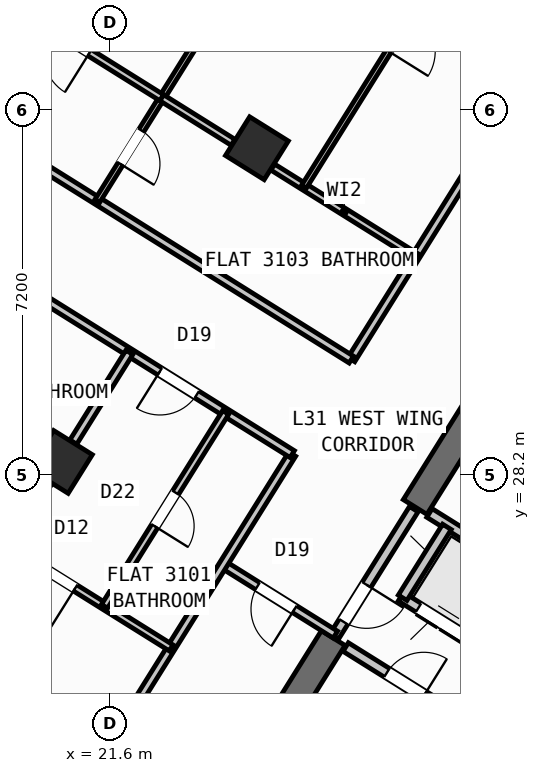
"""IFC4 building model, lengths in metres.
Left out: names, types, materials, properties, quantities, classifications, styles, units other than length and angle.
Written with IfcOpenShell. Run it as: python <this file> out.ifc"""

import sys

from ifc_helpers import new_model, si_unit, direction, frame, frame_2d, origin, origin_2d, place, context, subcontext, project, spatial, rectangle, hollow_rectangle, extrude, source, transform, mapped, element, fill, save


model = new_model("IFC4")
c1 = context("Model", 3, precision=1e-05, world=origin(), true_north=direction((0.0, 1.0)))
c2 = subcontext(c1, "Body", "Model", "MODEL_VIEW")
j1 = project(units=[si_unit("LENGTHUNIT", "METRE"), si_unit("PLANEANGLEUNIT", "RADIAN")], contexts=[c1])
p1 = place(None, origin())
s1 = spatial("IfcSite", under=j1, at=p1, CompositionType="ELEMENT")
p2 = place(p1, origin())
s2 = spatial("IfcBuilding", under=s1, at=p2, CompositionType="ELEMENT")
p3 = place(p2, frame((0.0, 0.0, 123.3)))
s3 = spatial("IfcBuildingStorey", under=s2, at=p3, CompositionType="ELEMENT", Elevation=123.3)
p4 = place(p3, frame((29.517, 30.594, 0.0), z_axis=(0.0, 0.0, 1.0), x_axis=(-0.529906864564, -0.848055844204, 0.0)))
e1 = element("IfcWall", 1, at=p4, inside=s3, PredefinedType="SHEAR", context=c2, shape_type="SweptSolid", body=[
    extrude(rectangle(XDim=3.575, YDim=0.55, at=frame_2d((1.788, 0.0))), origin(), (0.0, 0.0, 1.0), 4.22),
])
p5 = place(p3, frame((26.007, 24.976, 0.0), z_axis=(0.0, 0.0, 1.0), x_axis=(-0.529923795287, -0.848045264823, 0.0)))
e2 = element("IfcWall", 2, at=p5, inside=s3, PredefinedType="SHEAR", context=c2, shape_type="SweptSolid", body=[
    extrude(rectangle(XDim=6.425, YDim=0.55, at=frame_2d((3.212, 0.0))), origin(), (0.0, 0.0, 1.0), 4.22),
])
m1 = source(origin(), c2, "Body", "SweptSolid", [
    extrude(hollow_rectangle(XDim=0.9, YDim=0.9, WallThickness=0.036, at=origin_2d()), origin(), (0.0, 0.0, 1.0), 4.5),
])
for number, where, z_axis, x_axis in (
    (3, (24.5, 34.643, 0.0), (0.0, 0.0, 1.0), (-0.848, 0.53, 0.0)),
    (4, (20.632, 28.452, 0.0), (0.0, 0.0, 1.0), (-0.848, 0.53, 0.0)),
):
    element("IfcColumn", number, at=place(p3, frame(where, z_axis=z_axis, x_axis=x_axis)), inside=s3, PredefinedType="COLUMN", context=c2, shape_type="MappedRepresentation", body=[
        mapped(m1, transform((0.0, 0.0, 0.0), scale=1.0)),
    ])
p6 = place(p3, frame((31.76, 12.183, 0.0), z_axis=(0.0, 0.0, 1.0), x_axis=(-0.848047074256, 0.529920899612, 0.0)))
e5 = element("IfcWall", 5, at=p6, inside=s3, PredefinedType="STANDARD", context=c2, shape_type="SweptSolid", body=[
    extrude(rectangle(XDim=30.652, YDim=0.32, at=frame_2d((15.326, 0.0))), origin(), (0.0, 0.0, 1.0), 4.22),
])
p7 = place(p6, frame((14.966, 0.0, 0.0)))
e6 = element("IfcOpeningElement", 6, at=p7, cuts=e5, PredefinedType="OPENING", context=c2, shape_type="SweptSolid", body=[
    extrude(rectangle(XDim=1.2, YDim=2.15, at=frame_2d((0.6, 1.075))), frame((0.0, 0.17, 0.0), z_axis=(0.0, -1.0, 0.0), x_axis=(1.0, 0.0, 0.0)), (0.0, 0.0, 1.0), 0.34),
])
p8 = place(p6, frame((1.871, 0.0, 0.8)))
e7 = element("IfcOpeningElement", 7, at=p8, cuts=e5, PredefinedType="OPENING", context=c2, shape_type="SweptSolid", body=[
    extrude(rectangle(XDim=2.1, YDim=1.55, at=frame_2d((1.05, 0.775))), frame((0.0, 0.17, 0.0), z_axis=(0.0, -1.0, 0.0), x_axis=(1.0, 0.0, 0.0)), (0.0, 0.0, 1.0), 0.34),
])
p9 = place(p6, frame((6.546, 0.0, 0.8)))
e8 = element("IfcOpeningElement", 8, at=p9, cuts=e5, PredefinedType="OPENING", context=c2, shape_type="SweptSolid", body=[
    extrude(rectangle(XDim=2.1, YDim=1.55, at=frame_2d((1.05, 0.775))), frame((0.0, 0.17, 0.0), z_axis=(0.0, -1.0, 0.0), x_axis=(1.0, 0.0, 0.0)), (0.0, 0.0, 1.0), 0.34),
])
p10 = place(p6, frame((20.508, 0.0, 0.85)))
e9 = element("IfcOpeningElement", 9, at=p10, cuts=e5, PredefinedType="OPENING", context=c2, shape_type="SweptSolid", body=[
    extrude(rectangle(XDim=1.5, YDim=1.5, at=frame_2d((0.75, 0.75))), frame((0.0, 0.17, 0.0), z_axis=(0.0, -1.0, 0.0), x_axis=(1.0, 0.0, 0.0)), (0.0, 0.0, 1.0), 0.34),
])
p11 = place(p6, frame((27.253, 0.0, 0.95)))
e10 = element("IfcOpeningElement", 10, at=p11, cuts=e5, PredefinedType="OPENING", context=c2, shape_type="SweptSolid", body=[
    extrude(rectangle(XDim=1.2, YDim=1.4, at=frame_2d((0.6, 0.7))), frame((0.0, 0.17, 0.0), z_axis=(0.0, -1.0, 0.0), x_axis=(1.0, 0.0, 0.0)), (0.0, 0.0, 1.0), 0.34),
])
p12 = place(p3, frame((17.424, 47.083, 0.0), z_axis=(0.0, 0.0, 1.0), x_axis=(0.848049927979, -0.529916332693, 0.0)))
e11 = element("IfcWall", 11, at=p12, inside=s3, PredefinedType="STANDARD", context=c2, shape_type="SweptSolid", body=[
    extrude(rectangle(XDim=29.223, YDim=0.32, at=frame_2d((14.612, 0.0))), origin(), (0.0, 0.0, 1.0), 4.22),
])
p13 = place(p12, frame((8.839, 0.0, 0.0)))
e12 = element("IfcOpeningElement", 12, at=p13, cuts=e11, PredefinedType="OPENING", context=c2, shape_type="SweptSolid", body=[
    extrude(rectangle(XDim=1.05, YDim=2.15, at=frame_2d((0.525, 1.075))), frame((0.0, 0.17, 0.0), z_axis=(0.0, -1.0, 0.0), x_axis=(1.0, 0.0, 0.0)), (0.0, 0.0, 1.0), 0.34),
])
p14 = place(p12, frame((0.719, 0.0, 0.85)))
e13 = element("IfcOpeningElement", 13, at=p14, cuts=e11, PredefinedType="OPENING", context=c2, shape_type="SweptSolid", body=[
    extrude(rectangle(XDim=1.8, YDim=1.5, at=frame_2d((0.9, 0.75))), frame((0.0, 0.17, 0.0), z_axis=(0.0, -1.0, 0.0), x_axis=(1.0, 0.0, 0.0)), (0.0, 0.0, 1.0), 0.34),
])
p15 = place(p12, frame((3.981, 0.0, 0.85)))
e14 = element("IfcOpeningElement", 14, at=p15, cuts=e11, PredefinedType="OPENING", context=c2, shape_type="SweptSolid", body=[
    extrude(rectangle(XDim=1.5, YDim=1.5, at=frame_2d((0.75, 0.75))), frame((0.0, 0.17, 0.0), z_axis=(0.0, -1.0, 0.0), x_axis=(1.0, 0.0, 0.0)), (0.0, 0.0, 1.0), 0.34),
])
p16 = place(p12, frame((7.021, 0.0, 0.95)))
e15 = element("IfcOpeningElement", 15, at=p16, cuts=e11, PredefinedType="OPENING", context=c2, shape_type="SweptSolid", body=[
    extrude(rectangle(XDim=1.2, YDim=1.4, at=frame_2d((0.6, 0.7))), frame((0.0, 0.17, 0.0), z_axis=(0.0, -1.0, 0.0), x_axis=(1.0, 0.0, 0.0)), (0.0, 0.0, 1.0), 0.34),
])
p17 = place(p12, frame((14.471, 0.0, 0.95)))
e16 = element("IfcOpeningElement", 16, at=p17, cuts=e11, PredefinedType="OPENING", context=c2, shape_type="SweptSolid", body=[
    extrude(rectangle(XDim=1.2, YDim=1.4, at=frame_2d((0.6, 0.7))), frame((0.0, 0.17, 0.0), z_axis=(0.0, -1.0, 0.0), x_axis=(1.0, 0.0, 0.0)), (0.0, 0.0, 1.0), 0.34),
])
p18 = place(p12, frame((17.254, 0.0, 1.0)))
e17 = element("IfcOpeningElement", 17, at=p18, cuts=e11, PredefinedType="OPENING", context=c2, shape_type="SweptSolid", body=[
    extrude(rectangle(XDim=0.9, YDim=1.25, at=frame_2d((0.45, 0.625))), frame((0.0, 0.17, 0.0), z_axis=(0.0, -1.0, 0.0), x_axis=(1.0, 0.0, 0.0)), (0.0, 0.0, 1.0), 0.34),
])
p19 = place(p12, frame((20.764, 0.0, 0.8)))
e18 = element("IfcOpeningElement", 18, at=p19, cuts=e11, PredefinedType="OPENING", context=c2, shape_type="SweptSolid", body=[
    extrude(rectangle(XDim=2.1, YDim=1.55, at=frame_2d((1.05, 0.775))), frame((0.0, 0.17, 0.0), z_axis=(0.0, -1.0, 0.0), x_axis=(1.0, 0.0, 0.0)), (0.0, 0.0, 1.0), 0.34),
])
p20 = place(p12, frame((25.403, 0.0, 0.8)))
e19 = element("IfcOpeningElement", 19, at=p20, cuts=e11, PredefinedType="OPENING", context=c2, shape_type="SweptSolid", body=[
    extrude(rectangle(XDim=2.1, YDim=1.55, at=frame_2d((1.05, 0.775))), frame((0.0, 0.17, 0.0), z_axis=(0.0, -1.0, 0.0), x_axis=(1.0, 0.0, 0.0)), (0.0, 0.0, 1.0), 0.34),
])
p21 = place(p3, frame((31.822, 24.998, 0.0), z_axis=(0.0, 0.0, 1.0), x_axis=(-0.848036912365, 0.52993716162, 0.0)))
e20 = element("IfcWall", 20, at=p21, inside=s3, PredefinedType="STANDARD", context=c2, shape_type="SweptSolid", body=[
    extrude(rectangle(XDim=4.618, YDim=0.2, at=frame_2d((2.309, 0.0))), origin(), (0.0, 0.0, 1.0), 4.21),
])
p22 = place(p3, frame((32.108, 22.814, 0.0), z_axis=(0.0, 0.0, 1.0), x_axis=(-0.848042229521, 0.529928652696, 0.0)))
e21 = element("IfcWall", 21, at=p22, inside=s3, PredefinedType="STANDARD", context=c2, shape_type="SweptSolid", body=[
    extrude(rectangle(XDim=5.62, YDim=0.2, at=frame_2d((2.81, 0.0))), origin(), (0.0, 0.0, 1.0), 4.21),
])
p23 = place(p22, frame((0.39, 0.0, 0.0)))
e22 = element("IfcOpeningElement", 22, at=p23, cuts=e21, PredefinedType="OPENING", context=c2, shape_type="SweptSolid", body=[
    extrude(rectangle(XDim=1.1, YDim=2.15, at=frame_2d((0.55, 1.075))), frame((0.0, 0.11, 0.0), z_axis=(0.0, -1.0, 0.0), x_axis=(1.0, 0.0, 0.0)), (0.0, 0.0, 1.0), 0.22),
])
p24 = place(p22, frame((2.25, 0.0, 0.0)))
e23 = element("IfcOpeningElement", 23, at=p24, cuts=e21, PredefinedType="OPENING", context=c2, shape_type="SweptSolid", body=[
    extrude(rectangle(XDim=1.1, YDim=2.15, at=frame_2d((0.55, 1.075))), frame((0.0, 0.11, 0.0), z_axis=(0.0, -1.0, 0.0), x_axis=(1.0, 0.0, 0.0)), (0.0, 0.0, 1.0), 0.22),
])
p25 = place(p22, frame((4.11, 0.0, 0.0)))
e24 = element("IfcOpeningElement", 24, at=p25, cuts=e21, PredefinedType="OPENING", context=c2, shape_type="SweptSolid", body=[
    extrude(rectangle(XDim=1.1, YDim=2.15, at=frame_2d((0.55, 1.075))), frame((0.0, 0.11, 0.0), z_axis=(0.0, -1.0, 0.0), x_axis=(1.0, 0.0, 0.0)), (0.0, 0.0, 1.0), 0.22),
])
p26 = place(p3, frame((28.25, 27.17, 0.0), z_axis=(0.0, 0.0, 1.0), x_axis=(-0.529905827651, -0.848056492117, 0.0)))
e25 = element("IfcWall", 25, at=p26, inside=s3, PredefinedType="STANDARD", context=c2, shape_type="SweptSolid", body=[
    extrude(rectangle(XDim=1.65, YDim=0.2, at=frame_2d((0.825, 0.0))), origin(), (0.0, 0.0, 1.0), 4.21),
])
p27 = place(p3, frame((31.525, 21.504, 0.0), z_axis=(0.0, 0.0, 1.0), x_axis=(-0.848040211232, 0.529931882541, 0.0)))
e26 = element("IfcWall", 26, at=p27, inside=s3, PredefinedType="STANDARD", context=c2, shape_type="SweptSolid", body=[
    extrude(rectangle(XDim=6.218, YDim=0.2, at=frame_2d((3.109, 0.0))), origin(), (0.0, 0.0, 1.0), 4.21),
])
p28 = place(p27, frame((4.4, 0.0, 0.0)))
e27 = element("IfcOpeningElement", 27, at=p28, cuts=e26, PredefinedType="OPENING", context=c2, shape_type="SweptSolid", body=[
    extrude(rectangle(XDim=0.86, YDim=2.05, at=frame_2d((0.43, 1.025))), frame((0.0, 0.11, 0.0), z_axis=(0.0, -1.0, 0.0), x_axis=(1.0, 0.0, 0.0)), (0.0, 0.0, 1.0), 0.22),
])
p29 = place(p27, frame((1.45, 0.0, 0.0)))
e28 = element("IfcOpeningElement", 28, at=p29, cuts=e26, PredefinedType="OPENING", context=c2, shape_type="SweptSolid", body=[
    extrude(rectangle(XDim=0.86, YDim=2.05, at=frame_2d((0.43, 1.025))), frame((0.0, 0.11, 0.0), z_axis=(0.0, -1.0, 0.0), x_axis=(1.0, 0.0, 0.0)), (0.0, 0.0, 1.0), 0.22),
])
p30 = place(p3, frame((27.596, 27.52, 0.0), z_axis=(0.0, 0.0, 1.0), x_axis=(-0.529865479138, -0.848081702443, 0.0)))
e29 = element("IfcWall", 29, at=p30, inside=s3, PredefinedType="STANDARD", context=c2, shape_type="SweptSolid", body=[
    extrude(rectangle(XDim=2.96, YDim=0.2, at=frame_2d((1.48, 0.0))), origin(), (0.0, 0.0, 1.0), 2.395),
])
p31 = place(p30, frame((1.76, 0.0, 0.0)))
e30 = element("IfcOpeningElement", 30, at=p31, cuts=e29, PredefinedType="OPENING", context=c2, shape_type="SweptSolid", body=[
    extrude(rectangle(XDim=0.86, YDim=2.05, at=frame_2d((0.43, 1.025))), frame((0.0, 0.11, 0.0), z_axis=(0.0, -1.0, 0.0), x_axis=(1.0, 0.0, 0.0)), (0.0, 0.0, 1.0), 0.22),
])
p32 = place(p3, frame((26.049, 25.044, 0.0), z_axis=(0.0, 0.0, 1.0), x_axis=(-0.848050851465, 0.529914854792, 0.0)))
e31 = element("IfcWall", 31, at=p32, inside=s3, PredefinedType="PARTITIONING", context=c2, shape_type="SweptSolid", body=[
    extrude(rectangle(XDim=2.61, YDim=0.16, at=frame_2d((1.305, 0.0))), origin(), (0.0, 0.0, 1.0), 3.645),
])
p33 = place(p32, frame((0.95, 0.0, 0.0)))
e32 = element("IfcOpeningElement", 32, at=p33, cuts=e31, PredefinedType="OPENING", context=c2, shape_type="SweptSolid", body=[
    extrude(rectangle(XDim=0.86, YDim=2.05, at=frame_2d((0.43, 1.025))), frame((0.0, 0.09, 0.0), z_axis=(0.0, -1.0, 0.0), x_axis=(1.0, 0.0, 0.0)), (0.0, 0.0, 1.0), 0.18),
])
p34 = place(p3, frame((31.239, 38.274, 0.0), z_axis=(0.0, 0.0, 1.0), x_axis=(-0.529920220799, -0.848047498427, 0.0)))
e33 = element("IfcWall", 33, at=p34, inside=s3, PredefinedType="PARTITIONING", context=c2, shape_type="SweptSolid", body=[
    extrude(rectangle(XDim=9.2, YDim=0.16, at=frame_2d((4.6, 0.0))), origin(), (0.0, 0.0, 1.0), 4.21),
])
p35 = place(p3, frame((25.198, 28.606, 0.0), z_axis=(0.0, 0.0, 1.0), x_axis=(-0.529926497642, -0.848043576178, 0.0)))
e34 = element("IfcWall", 34, at=p35, inside=s3, PredefinedType="PARTITIONING", context=c2, shape_type="SweptSolid", body=[
    extrude(rectangle(XDim=10.3, YDim=0.16, at=frame_2d((5.15, 0.0))), origin(), (0.0, 0.0, 1.0), 4.21),
])
p36 = place(p3, frame((26.363, 30.472, 0.0), z_axis=(0.0, 0.0, 1.0), x_axis=(-0.848052408131, 0.529912363569, 0.0)))
e35 = element("IfcWall", 35, at=p36, inside=s3, PredefinedType="PARTITIONING", context=c2, shape_type="SweptSolid", body=[
    extrude(rectangle(XDim=16.73, YDim=0.16, at=frame_2d((8.365, 0.0))), origin(), (0.0, 0.0, 1.0), 4.21),
])
p37 = place(p36, frame((7.55, 0.0, 0.0)))
e36 = element("IfcOpeningElement", 36, at=p37, cuts=e35, PredefinedType="OPENING", context=c2, shape_type="SweptSolid", body=[
    extrude(rectangle(XDim=1.0, YDim=2.1, at=frame_2d((0.5, 1.05))), frame((0.0, 0.09, 0.0), z_axis=(0.0, -1.0, 0.0), x_axis=(1.0, 0.0, 0.0)), (0.0, 0.0, 1.0), 0.18),
])
p38 = place(p36, frame((11.14, 0.0, 0.0)))
e37 = element("IfcOpeningElement", 37, at=p38, cuts=e35, PredefinedType="OPENING", context=c2, shape_type="SweptSolid", body=[
    extrude(rectangle(XDim=1.0, YDim=2.1, at=frame_2d((0.5, 1.05))), frame((0.0, 0.09, 0.0), z_axis=(0.0, -1.0, 0.0), x_axis=(1.0, 0.0, 0.0)), (0.0, 0.0, 1.0), 0.18),
])
p39 = place(p3, frame((25.198, 28.606, 0.0), z_axis=(0.0, 0.0, 1.0), x_axis=(-0.848052408131, 0.529912363569, 0.0)))
e38 = element("IfcWall", 38, at=p39, inside=s3, PredefinedType="PARTITIONING", context=c2, shape_type="SweptSolid", body=[
    extrude(rectangle(XDim=16.73, YDim=0.16, at=frame_2d((8.365, 0.0))), origin(), (0.0, 0.0, 1.0), 4.21),
])
p40 = place(p39, frame((2.22, 0.0, 0.0)))
e39 = element("IfcOpeningElement", 39, at=p40, cuts=e38, PredefinedType="OPENING", context=c2, shape_type="SweptSolid", body=[
    extrude(rectangle(XDim=0.86, YDim=2.05, at=frame_2d((0.43, 1.025))), frame((0.0, 0.09, 0.0), z_axis=(0.0, -1.0, 0.0), x_axis=(1.0, 0.0, 0.0)), (0.0, 0.0, 1.0), 0.18),
])
p41 = place(p39, frame((12.084, 0.0, 0.0)))
e40 = element("IfcOpeningElement", 40, at=p41, cuts=e38, PredefinedType="OPENING", context=c2, shape_type="SweptSolid", body=[
    extrude(rectangle(XDim=1.0, YDim=2.1, at=frame_2d((0.5, 1.05))), frame((0.0, 0.09, 0.0), z_axis=(0.0, -1.0, 0.0), x_axis=(1.0, 0.0, 0.0)), (0.0, 0.0, 1.0), 0.18),
])
p42 = place(p3, frame((21.983, 30.615, 0.0), z_axis=(0.0, 0.0, 1.0), x_axis=(-0.529956894714, -0.848024580862, 0.0)))
e41 = element("IfcWall", 41, at=p42, inside=s3, PredefinedType="PARTITIONING", context=c2, shape_type="SweptSolid", body=[
    extrude(rectangle(XDim=2.088, YDim=0.16, at=frame_2d((1.044, 0.0))), origin(), (0.0, 0.0, 1.0), 2.395),
])
p43 = place(p3, frame((22.807, 24.781, 0.0), z_axis=(0.0, 0.0, 1.0), x_axis=(-0.84803087207, 0.529946827537, 0.0)))
e42 = element("IfcWall", 42, at=p43, inside=s3, PredefinedType="PLUMBINGWALL", context=c2, shape_type="SweptSolid", body=[
    extrude(rectangle(XDim=3.79, YDim=0.14, at=frame_2d((1.895, 0.0))), origin(), (0.0, 0.0, 1.0), 4.21),
])
p44 = place(p43, frame((2.23, 0.0, 0.0)))
e43 = element("IfcOpeningElement", 43, at=p44, cuts=e42, PredefinedType="OPENING", context=c2, shape_type="SweptSolid", body=[
    extrude(rectangle(XDim=0.92, YDim=2.08, at=frame_2d((0.46, 1.04))), frame((0.0, 0.08, 0.0), z_axis=(0.0, -1.0, 0.0), x_axis=(1.0, 0.0, 0.0)), (0.0, 0.0, 1.0), 0.16),
])
p45 = place(p3, frame((23.883, 29.427, 0.0), z_axis=(0.0, 0.0, 1.0), x_axis=(-0.529950281337, -0.84802871373, 0.0)))
e44 = element("IfcWall", 44, at=p45, inside=s3, PredefinedType="PLUMBINGWALL", context=c2, shape_type="SweptSolid", body=[
    extrude(rectangle(XDim=4.51, YDim=0.14, at=frame_2d((2.255, 0.0))), origin(), (0.0, 0.0, 1.0), 3.865),
])
p46 = place(p45, frame((1.865, 0.0, 0.0)))
e45 = element("IfcOpeningElement", 45, at=p46, cuts=e44, PredefinedType="OPENING", context=c2, shape_type="SweptSolid", body=[
    extrude(rectangle(XDim=0.78, YDim=2.05, at=frame_2d((0.39, 1.025))), frame((0.0, 0.08, 0.0), z_axis=(0.0, -1.0, 0.0), x_axis=(1.0, 0.0, 0.0)), (0.0, 0.0, 1.0), 0.16),
])
p47 = place(p3, frame((26.37, 41.635, 0.0), z_axis=(0.0, 0.0, 1.0), x_axis=(-0.529917830441, -0.848048992088, 0.0)))
e46 = element("IfcWall", 46, at=p47, inside=s3, PredefinedType="PARTITIONING", context=c2, shape_type="SweptSolid", body=[
    extrude(rectangle(XDim=9.47, YDim=0.11, at=frame_2d((4.735, 0.0))), origin(), (0.0, 0.0, 1.0), 3.865),
])
p48 = place(p47, frame((7.83, 0.0, 0.0)))
e47 = element("IfcOpeningElement", 47, at=p48, cuts=e46, PredefinedType="OPENING", context=c2, shape_type="SweptSolid", body=[
    extrude(rectangle(XDim=0.78, YDim=2.05, at=frame_2d((0.39, 1.025))), frame((0.0, 0.065, 0.0), z_axis=(0.0, -1.0, 0.0), x_axis=(1.0, 0.0, 0.0)), (0.0, 0.0, 1.0), 0.13),
])
p49 = place(p47, frame((3.075, 0.0, 0.0)))
e48 = element("IfcOpeningElement", 48, at=p49, cuts=e46, PredefinedType="OPENING", context=c2, shape_type="SweptSolid", body=[
    extrude(rectangle(XDim=0.92, YDim=2.08, at=frame_2d((0.46, 1.04))), frame((0.0, 0.065, 0.0), z_axis=(0.0, -1.0, 0.0), x_axis=(1.0, 0.0, 0.0)), (0.0, 0.0, 1.0), 0.13),
])
p50 = place(p3, frame((22.623, 35.639, 0.0), z_axis=(0.0, 0.0, 1.0), x_axis=(-0.8480485946, 0.529918466555, 0.0)))
e49 = element("IfcWall", 49, at=p50, inside=s3, PredefinedType="PLUMBINGWALL", context=c2, shape_type="SweptSolid", body=[
    extrude(rectangle(XDim=3.818, YDim=0.14, at=frame_2d((1.909, 0.0))), origin(), (0.0, 0.0, 1.0), 2.395),
])
p51 = place(p50, frame((1.68, 0.0, 0.0)))
e50 = element("IfcOpeningElement", 50, at=p51, cuts=e49, PredefinedType="OPENING", context=c2, shape_type="SweptSolid", body=[
    extrude(rectangle(XDim=0.92, YDim=2.08, at=frame_2d((0.46, 1.04))), frame((0.0, 0.08, 0.0), z_axis=(0.0, -1.0, 0.0), x_axis=(1.0, 0.0, 0.0)), (0.0, 0.0, 1.0), 0.16),
])
p52 = place(p3, frame((27.635, 32.507, 0.0), z_axis=(0.0, 0.0, 1.0), x_axis=(-0.848064240775, 0.529893426567, 0.0)))
e51 = element("IfcWall", 51, at=p52, inside=s3, PredefinedType="PLUMBINGWALL", context=c2, shape_type="SweptSolid", body=[
    extrude(rectangle(XDim=3.328, YDim=0.14, at=frame_2d((1.664, 0.0))), origin(), (0.0, 0.0, 1.0), 2.395),
])
p53 = place(p3, frame((24.029, 34.76, 0.0), z_axis=(0.0, 0.0, 1.0), x_axis=(-0.848023120795, 0.529959231071, 0.0)))
e52 = element("IfcWall", 52, at=p53, inside=s3, PredefinedType="PLUMBINGWALL", context=c2, shape_type="SweptSolid", body=[
    extrude(rectangle(XDim=1.658, YDim=0.14, at=frame_2d((0.829, 0.0))), origin(), (0.0, 0.0, 1.0), 2.395),
])
p54 = place(p3, frame((29.177, 39.881, 0.0), z_axis=(0.0, 0.0, 1.0), x_axis=(-0.529930649952, -0.848040981463, 0.0)))
e53 = element("IfcWall", 53, at=p54, inside=s3, PredefinedType="PARTITIONING", context=c2, shape_type="SweptSolid", body=[
    extrude(rectangle(XDim=7.07, YDim=0.11, at=frame_2d((3.535, 0.0))), origin(), (0.0, 0.0, 1.0), 4.21),
])
p55 = place(p54, frame((3.0, 0.0, 0.0)))
e54 = element("IfcOpeningElement", 54, at=p55, cuts=e53, PredefinedType="OPENING", context=c2, shape_type="SweptSolid", body=[
    extrude(rectangle(XDim=0.92, YDim=2.08, at=frame_2d((0.46, 1.04))), frame((0.0, 0.065, 0.0), z_axis=(0.0, -1.0, 0.0), x_axis=(1.0, 0.0, 0.0)), (0.0, 0.0, 1.0), 0.13),
])
m2 = source(origin(), c2, "Body", "SweptSolid", [
    extrude(rectangle(XDim=1.1, YDim=2.15, at=frame_2d((0.55, 1.075))), frame((0.0, 0.025, 0.0), z_axis=(0.0, -1.0, 0.0), x_axis=(1.0, 0.0, 0.0)), (0.0, 0.0, 1.0), 0.05),
])
p56 = place(p25, origin())
e55 = element("IfcDoor", 55, at=p56, inside=s3, OperationType="DOUBLE_DOOR_SLIDING", PredefinedType="DOOR", context=c2, shape_type="MappedRepresentation", body=[
    mapped(m2, transform((0.0, 0.0, 0.0), scale=1.0)),
])
fill(e24, e55)
m3 = source(origin(), c2, "Body", "SweptSolid", [
    extrude(rectangle(XDim=0.86, YDim=2.05, at=frame_2d((0.43, 1.025))), frame((0.0, 0.025, 0.0), z_axis=(0.0, -1.0, 0.0), x_axis=(1.0, 0.0, 0.0)), (0.0, 0.0, 1.0), 0.05),
])
p57 = place(p28, frame((0.86, 0.0, 0.0), z_axis=(0.0, 0.0, 1.0), x_axis=(-1.0, 0.0, 0.0)))
e56 = element("IfcDoor", 56, at=p57, inside=s3, OperationType="SINGLE_SWING_RIGHT", PredefinedType="DOOR", context=c2, shape_type="MappedRepresentation", body=[
    mapped(m3, transform((0.0, 0.0, 0.0), scale=1.0)),
])
fill(e27, e56)
p58 = place(p33, origin())
e57 = element("IfcDoor", 57, at=p58, inside=s3, OperationType="SINGLE_SWING_LEFT", PredefinedType="DOOR", context=c2, shape_type="MappedRepresentation", body=[
    mapped(m3, transform((0.0, 0.0, 0.0), scale=1.0)),
])
fill(e32, e57)
p59 = place(p31, origin())
e58 = element("IfcDoor", 58, at=p59, inside=s3, OperationType="SINGLE_SWING_LEFT", PredefinedType="DOOR", context=c2, shape_type="MappedRepresentation", body=[
    mapped(m3, transform((0.0, 0.0, 0.0), scale=1.0)),
])
fill(e30, e58)
p60 = place(p40, origin())
e59 = element("IfcDoor", 59, at=p60, inside=s3, OperationType="SINGLE_SWING_RIGHT", PredefinedType="DOOR", context=c2, shape_type="MappedRepresentation", body=[
    mapped(m3, transform((0.0, 0.0, 0.0), scale=1.0)),
])
fill(e39, e59)
m4 = source(origin(), c2, "Body", "SweptSolid", [
    extrude(rectangle(XDim=0.92, YDim=2.08, at=frame_2d((0.46, 1.04))), frame((0.0, 0.025, 0.0), z_axis=(0.0, -1.0, 0.0), x_axis=(1.0, 0.0, 0.0)), (0.0, 0.0, 1.0), 0.05),
])
p61 = place(p44, origin())
e60 = element("IfcDoor", 60, at=p61, inside=s3, OperationType="SINGLE_SWING_LEFT", PredefinedType="DOOR", context=c2, shape_type="MappedRepresentation", body=[
    mapped(m4, transform((0.0, 0.0, 0.0), scale=1.0)),
])
fill(e43, e60)
m5 = source(origin(), c2, "Body", "SweptSolid", [
    extrude(rectangle(XDim=0.78, YDim=2.05, at=frame_2d((0.39, 1.025))), frame((0.0, 0.025, 0.0), z_axis=(0.0, -1.0, 0.0), x_axis=(1.0, 0.0, 0.0)), (0.0, 0.0, 1.0), 0.05),
])
p62 = place(p46, origin())
e61 = element("IfcDoor", 61, at=p62, inside=s3, OperationType="SINGLE_SWING_RIGHT", PredefinedType="DOOR", context=c2, shape_type="MappedRepresentation", body=[
    mapped(m5, transform((0.0, 0.0, 0.0), scale=1.0)),
])
fill(e45, e61)
p63 = place(p51, origin())
e62 = element("IfcDoor", 62, at=p63, inside=s3, OperationType="SINGLE_SWING_LEFT", PredefinedType="DOOR", context=c2, shape_type="MappedRepresentation", body=[
    mapped(m4, transform((0.0, 0.0, 0.0), scale=1.0)),
])
fill(e50, e62)
p64 = place(p48, origin())
e63 = element("IfcDoor", 63, at=p64, inside=s3, OperationType="SINGLE_SWING_RIGHT", PredefinedType="DOOR", context=c2, shape_type="MappedRepresentation", body=[
    mapped(m5, transform((0.0, 0.0, 0.0), scale=1.0)),
])
fill(e47, e63)
save(model, sys.argv[1])
